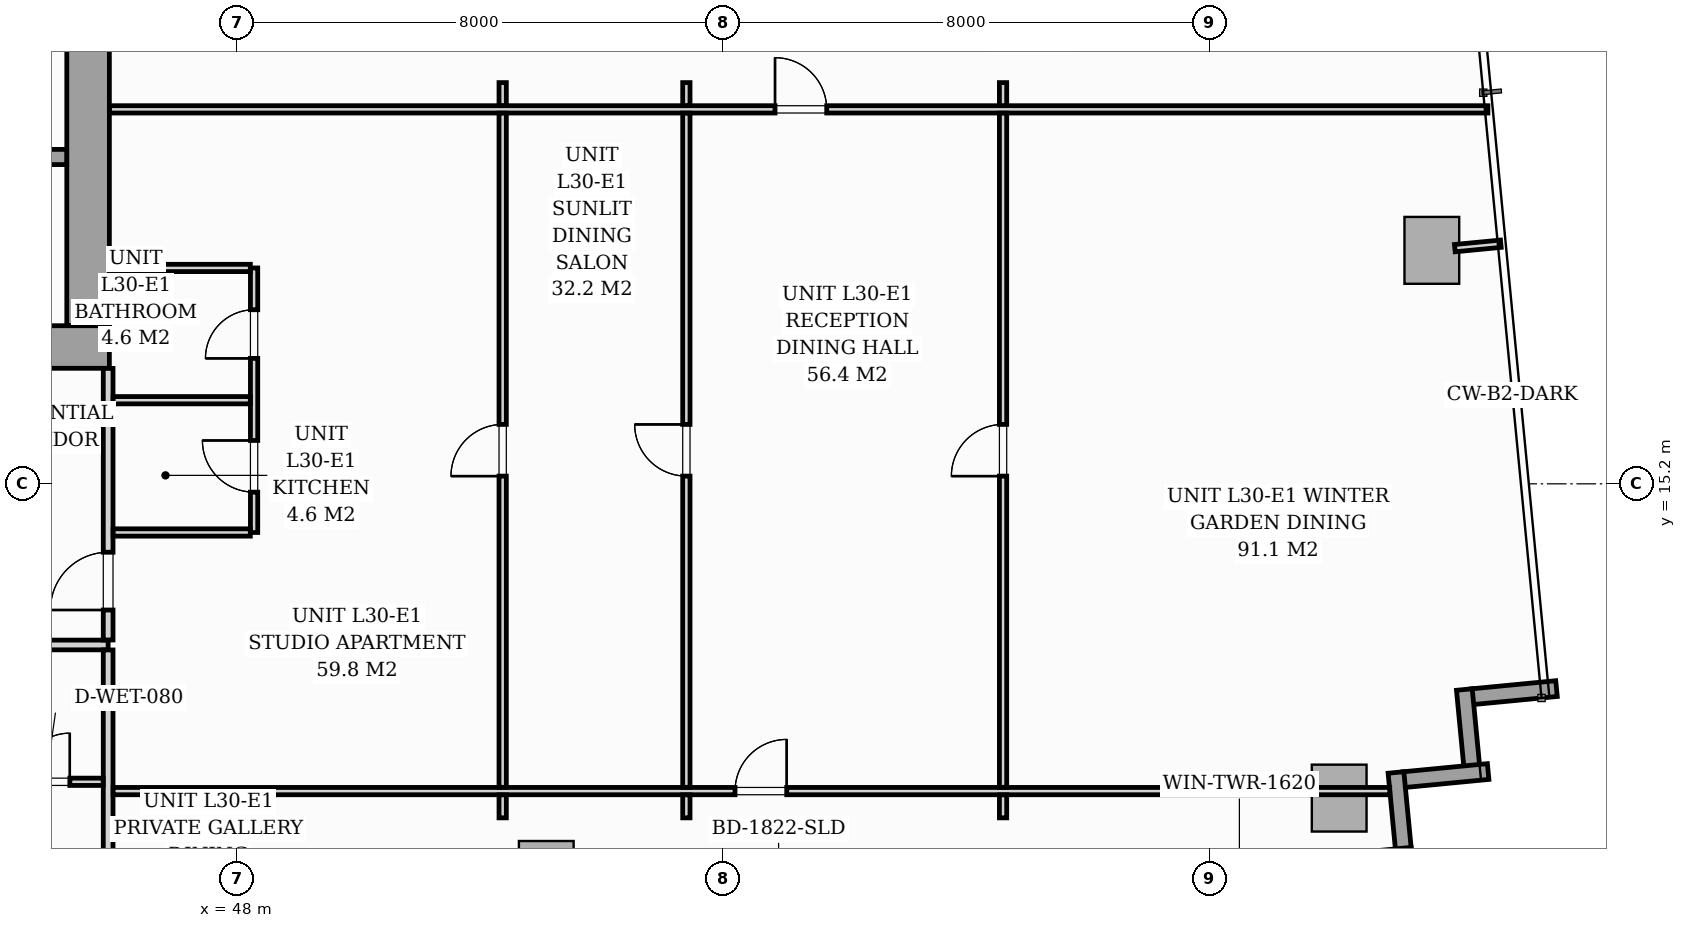
"""IFC4 building model, lengths in metres.
Left out: names, types, materials, properties, quantities, classifications, styles, units other than length and angle.
Written with IfcOpenShell. Run it as: python <this file> out.ifc"""

import sys

from ifc_helpers import new_model, si_unit, direction, frame, frame_2d, origin, origin_2d, place, context, subcontext, project, spatial, rectangle, i_section, extrude, source, transform, mapped, element, fill, save


model = new_model("IFC4")
c1 = context("Model", 3, precision=1e-05, world=origin(), true_north=direction((0.0, 1.0)))
c2 = subcontext(c1, "Body", "Model", "MODEL_VIEW")
j1 = project(units=[si_unit("LENGTHUNIT", "METRE"), si_unit("PLANEANGLEUNIT", "RADIAN")], contexts=[c1])
p1 = place(None, origin())
s1 = spatial("IfcSite", under=j1, at=p1, CompositionType="ELEMENT")
p2 = place(p1, origin())
s2 = spatial("IfcBuilding", under=s1, at=p2, CompositionType="ELEMENT")
p3 = place(p2, frame((0.0, 0.0, 106.6)))
s3 = spatial("IfcBuildingStorey", under=s2, at=p3, CompositionType="ELEMENT", Elevation=106.6)
m1 = source(origin(), c2, "Body", "SweptSolid", [
    extrude(i_section(OverallWidth=0.427, OverallDepth=0.483, WebThickness=0.051, FlangeThickness=0.082, FilletRadius=0.018, at=origin_2d()), origin(), (0.0, 0.0, 1.0), 3.196),
])
p4 = place(p3, frame((45.6, 17.4, 0.002), z_axis=(0.0, 0.0, 1.0), x_axis=(1.0, 0.0, 0.0)))
e1 = element("IfcColumn", 1, at=p4, inside=s3, PredefinedType="PILASTER", context=c2, shape_type="MappedRepresentation", body=[
    mapped(m1, transform((0.0, 0.0, 0.0), scale=1.0)),
])
m2 = source(origin(), c2, "Body", "SweptSolid", [
    extrude(rectangle(XDim=0.9, YDim=1.1, at=origin_2d()), origin(), (0.0, 0.0, 1.0), 3.196),
])
for number, where, z_axis, x_axis in (
    (2, (53.085, 8.776, 0.002), (0.0, 0.0, 1.0), (0.995, 0.096, 0.0)),
    (3, (66.125, 10.032, 0.002), (0.0, 0.0, 1.0), (0.995, 0.096, 0.0)),
    (4, (67.648, 19.039, 0.002), (0.0, 0.0, 1.0), (0.995, 0.096, 0.0)),
):
    element("IfcColumn", number, at=place(p3, frame(where, z_axis=z_axis, x_axis=x_axis)), inside=s3, PredefinedType="COLUMN", context=c2, shape_type="MappedRepresentation", body=[
        mapped(m2, transform((0.0, 0.0, 0.0), scale=1.0)),
    ])
for number, where, z_axis, x_axis in (
    (5, (69.698, 11.833, 0.0), (0.0, 0.0, 1.0), (-0.995, -0.096, 0.0)),
    (6, (68.183, 11.817, 0.0), (0.0, 0.0, 1.0), (0.096, -0.995, 0.0)),
):
    element("IfcWall", number, at=place(p3, frame(where, z_axis=z_axis, x_axis=x_axis)), inside=s3, PredefinedType="STANDARD", context=c2, shape_type="SweptSolid", body=[
        extrude(rectangle(XDim=1.395, YDim=0.26, at=frame_2d((0.697, 0.0))), origin(), (0.0, 0.0, 1.0), 2.94),
    ])
p5 = place(p3, frame((68.574, 10.469, 0.0), z_axis=(0.0, 0.0, 1.0), x_axis=(-0.99540774648, -0.095725744959, 0.0)))
e7 = element("IfcWall", 7, at=p5, inside=s3, PredefinedType="STANDARD", context=c2, shape_type="SweptSolid", body=[
    extrude(rectangle(XDim=1.395, YDim=0.26, at=frame_2d((0.698, 0.0))), origin(), (0.0, 0.0, 1.0), 2.94),
])
p6 = place(p3, frame((67.059, 10.453, 0.0), z_axis=(0.0, 0.0, 1.0), x_axis=(0.095915846097, -0.995389446633, 0.0)))
e8 = element("IfcWall", 8, at=p6, inside=s3, PredefinedType="STANDARD", context=c2, shape_type="SweptSolid", body=[
    extrude(rectangle(XDim=1.395, YDim=0.26, at=frame_2d((0.697, 0.0))), origin(), (0.0, 0.0, 1.0), 2.94),
])
p7 = place(p3, frame((67.32, 9.092, 0.0), z_axis=(0.0, 0.0, 1.0), x_axis=(-0.995396521236, -0.095842399342, 0.0)))
e9 = element("IfcWall", 9, at=p7, inside=s3, PredefinedType="STANDARD", context=c2, shape_type="SweptSolid", body=[
    extrude(rectangle(XDim=19.11, YDim=0.26, at=frame_2d((9.555, 0.0))), origin(), (0.0, 0.0, 1.0), 2.94),
])
p8 = place(p7, frame((9.563, 0.0, 0.0)))
e10 = element("IfcOpeningElement", 10, at=p8, cuts=e9, PredefinedType="OPENING", context=c2, shape_type="SweptSolid", body=[
    extrude(rectangle(XDim=1.8, YDim=2.06, at=frame_2d((0.9, 1.03))), frame((0.0, 0.14, 0.0), z_axis=(0.0, -1.0, 0.0), x_axis=(1.0, 0.0, 0.0)), (0.0, 0.0, 1.0), 0.28),
])
p9 = place(p7, frame((2.05, 0.0, 0.65)))
e11 = element("IfcOpeningElement", 11, at=p9, cuts=e9, PredefinedType="OPENING", context=c2, shape_type="SweptSolid", body=[
    extrude(rectangle(XDim=1.6, YDim=1.5, at=frame_2d((0.8, 0.75))), frame((0.0, 0.14, 0.0), z_axis=(0.0, -1.0, 0.0), x_axis=(1.0, 0.0, 0.0)), (0.0, 0.0, 1.0), 0.28),
])
p10 = place(p3, frame((26.1, 17.45, 0.0), z_axis=(0.0, 0.0, 1.0), x_axis=(1.0, 0.0, 0.0)))
e12 = element("IfcWall", 12, at=p10, inside=s3, PredefinedType="SHEAR", context=c2, shape_type="SweptSolid", body=[
    extrude(rectangle(XDim=19.8, YDim=0.7, at=frame_2d((9.9, 0.0))), origin(), (0.0, 0.0, 1.0), 3.2),
])
p11 = place(p10, frame((1.05, 0.0, 0.0)))
e13 = element("IfcOpeningElement", 13, at=p11, cuts=e12, PredefinedType="OPENING", context=c2, shape_type="SweptSolid", body=[
    extrude(rectangle(XDim=0.95, YDim=2.06, at=frame_2d((0.475, 1.03))), frame((0.0, 0.36, 0.0), z_axis=(0.0, -1.0, 0.0), x_axis=(1.0, 0.0, 0.0)), (0.0, 0.0, 1.0), 0.72),
])
p12 = place(p10, frame((9.48, 0.0, 0.0)))
e14 = element("IfcOpeningElement", 14, at=p12, cuts=e12, PredefinedType="OPENING", context=c2, shape_type="SweptSolid", body=[
    extrude(rectangle(XDim=0.85, YDim=2.0, at=frame_2d((0.425, 1.0))), frame((0.0, 0.36, 0.0), z_axis=(0.0, -1.0, 0.0), x_axis=(1.0, 0.0, 0.0)), (0.0, 0.0, 1.0), 0.72),
])
p13 = place(p10, frame((17.65, 0.0, 0.0)))
e15 = element("IfcOpeningElement", 15, at=p13, cuts=e12, PredefinedType="OPENING", context=c2, shape_type="SweptSolid", body=[
    extrude(rectangle(XDim=0.95, YDim=2.06, at=frame_2d((0.475, 1.03))), frame((0.0, 0.36, 0.0), z_axis=(0.0, -1.0, 0.0), x_axis=(1.0, 0.0, 0.0)), (0.0, 0.0, 1.0), 0.72),
])
p14 = place(p3, frame((45.55, 17.802, 0.0), z_axis=(0.0, 0.0, 1.0), x_axis=(0.0, 1.0, 0.0)))
e16 = element("IfcWall", 16, at=p14, inside=s3, PredefinedType="SHEAR", context=c2, shape_type="SweptSolid", body=[
    extrude(rectangle(XDim=5.796, YDim=0.7, at=frame_2d((2.898, 0.0))), origin(), (0.0, 0.0, 1.0), 3.2),
])
p15 = place(p3, frame((37.05, 20.575, 0.0), z_axis=(0.0, 0.0, 1.0), x_axis=(1.0, 0.0, 0.0)))
e17 = element("IfcWall", 17, at=p15, inside=s3, PredefinedType="SOLIDWALL", context=c2, shape_type="SweptSolid", body=[
    extrude(rectangle(XDim=8.148, YDim=0.25, at=frame_2d((4.074, 0.0))), origin(), (0.0, 0.0, 1.0), 3.2),
])
p16 = place(p15, frame((6.6, 0.0, 0.0)))
e18 = element("IfcOpeningElement", 18, at=p16, cuts=e17, PredefinedType="OPENING", context=c2, shape_type="SweptSolid", body=[
    extrude(rectangle(XDim=0.95, YDim=2.06, at=frame_2d((0.475, 1.03))), frame((0.0, 0.135, 0.0), z_axis=(0.0, -1.0, 0.0), x_axis=(1.0, 0.0, 0.0)), (0.0, 0.0, 1.0), 0.27),
])
p17 = place(p3, frame((21.5, 12.55, 0.0), z_axis=(0.0, 0.0, 1.0), x_axis=(1.0, 0.0, 0.0)))
e19 = element("IfcWall", 19, at=p17, inside=s3, PredefinedType="PARTITIONING", context=c2, shape_type="SweptSolid", body=[
    extrude(rectangle(XDim=24.38, YDim=0.16, at=frame_2d((12.19, 0.0))), origin(), (0.0, 0.0, 1.0), 2.94),
])
p18 = place(p17, frame((6.075, 0.0, 0.0)))
e20 = element("IfcOpeningElement", 20, at=p18, cuts=e19, PredefinedType="OPENING", context=c2, shape_type="SweptSolid", body=[
    extrude(rectangle(XDim=0.95, YDim=2.06, at=frame_2d((0.475, 1.03))), frame((0.0, 0.09, 0.0), z_axis=(0.0, -1.0, 0.0), x_axis=(1.0, 0.0, 0.0)), (0.0, 0.0, 1.0), 0.18),
])
p19 = place(p17, frame((10.519, 0.0, 0.0)))
e21 = element("IfcOpeningElement", 21, at=p19, cuts=e19, PredefinedType="OPENING", context=c2, shape_type="SweptSolid", body=[
    extrude(rectangle(XDim=0.95, YDim=2.06, at=frame_2d((0.475, 1.03))), frame((0.0, 0.09, 0.0), z_axis=(0.0, -1.0, 0.0), x_axis=(1.0, 0.0, 0.0)), (0.0, 0.0, 1.0), 0.18),
])
p20 = place(p17, frame((18.208, 0.0, 0.0)))
e22 = element("IfcOpeningElement", 22, at=p20, cuts=e19, PredefinedType="OPENING", context=c2, shape_type="SweptSolid", body=[
    extrude(rectangle(XDim=0.95, YDim=2.06, at=frame_2d((0.475, 1.03))), frame((0.0, 0.09, 0.0), z_axis=(0.0, -1.0, 0.0), x_axis=(1.0, 0.0, 0.0)), (0.0, 0.0, 1.0), 0.18),
])
p21 = place(p3, frame((45.88, 6.977, 0.0), z_axis=(0.0, 0.0, 1.0), x_axis=(0.0, 1.0, 0.0)))
e23 = element("IfcWall", 23, at=p21, inside=s3, PredefinedType="PARTITIONING", context=c2, shape_type="SweptSolid", body=[
    extrude(rectangle(XDim=5.491, YDim=0.16, at=frame_2d((2.745, 0.0))), origin(), (0.0, 0.0, 1.0), 2.94),
])
p22 = place(p3, frame((45.88, 12.632, 0.0), z_axis=(0.0, 0.0, 1.0), x_axis=(0.0, 1.0, 0.0)))
e24 = element("IfcWall", 24, at=p22, inside=s3, PredefinedType="PARTITIONING", context=c2, shape_type="SweptSolid", body=[
    extrude(rectangle(XDim=4.466, YDim=0.16, at=frame_2d((2.233, 0.0))), origin(), (0.0, 0.0, 1.0), 2.94),
])
p23 = place(p22, frame((0.493, 0.0, 0.0)))
e25 = element("IfcOpeningElement", 25, at=p23, cuts=e24, PredefinedType="OPENING", context=c2, shape_type="SweptSolid", body=[
    extrude(rectangle(XDim=0.95, YDim=2.06, at=frame_2d((0.475, 1.03))), frame((0.0, 0.09, 0.0), z_axis=(0.0, -1.0, 0.0), x_axis=(1.0, 0.0, 0.0)), (0.0, 0.0, 1.0), 0.18),
])
p24 = place(p3, frame((41.7, 10.3, 0.0), z_axis=(0.0, 0.0, 1.0), x_axis=(1.0, 0.0, 0.0)))
e26 = element("IfcWall", 26, at=p24, inside=s3, PredefinedType="PARTITIONING", context=c2, shape_type="SweptSolid", body=[
    extrude(rectangle(XDim=4.098, YDim=0.12, at=frame_2d((2.049, 0.0))), origin(), (0.0, 0.0, 1.0), 2.94),
])
p25 = place(p24, frame((0.675, 0.0, 0.0)))
e27 = element("IfcOpeningElement", 27, at=p25, cuts=e26, PredefinedType="OPENING", context=c2, shape_type="SweptSolid", body=[
    extrude(rectangle(XDim=0.85, YDim=2.05, at=frame_2d((0.425, 1.025))), frame((0.0, 0.07, 0.0), z_axis=(0.0, -1.0, 0.0), x_axis=(1.0, 0.0, 0.0)), (0.0, 0.0, 1.0), 0.14),
])
p26 = place(p24, frame((2.75, 0.0, 0.0)))
e28 = element("IfcOpeningElement", 28, at=p26, cuts=e26, PredefinedType="OPENING", context=c2, shape_type="SweptSolid", body=[
    extrude(rectangle(XDim=0.8, YDim=2.02, at=frame_2d((0.4, 1.01))), frame((0.0, 0.07, 0.0), z_axis=(0.0, -1.0, 0.0), x_axis=(1.0, 0.0, 0.0)), (0.0, 0.0, 1.0), 0.14),
])
p27 = place(p3, frame((48.28, 14.4, 0.0), z_axis=(0.0, 0.0, 1.0), x_axis=(0.0, 1.0, 0.0)))
e29 = element("IfcWall", 29, at=p27, inside=s3, PredefinedType="PARTITIONING", context=c2, shape_type="SweptSolid", body=[
    extrude(rectangle(XDim=4.35, YDim=0.12, at=frame_2d((2.175, 0.0))), origin(), (0.0, 0.0, 1.0), 2.94),
])
p28 = place(p27, frame((0.663, 0.0, 0.0)))
e30 = element("IfcOpeningElement", 30, at=p28, cuts=e29, PredefinedType="OPENING", context=c2, shape_type="SweptSolid", body=[
    extrude(rectangle(XDim=0.85, YDim=2.05, at=frame_2d((0.425, 1.025))), frame((0.0, 0.07, 0.0), z_axis=(0.0, -1.0, 0.0), x_axis=(1.0, 0.0, 0.0)), (0.0, 0.0, 1.0), 0.14),
])
p29 = place(p27, frame((2.863, 0.0, 0.0)))
e31 = element("IfcOpeningElement", 31, at=p29, cuts=e29, PredefinedType="OPENING", context=c2, shape_type="SweptSolid", body=[
    extrude(rectangle(XDim=0.8, YDim=2.02, at=frame_2d((0.4, 1.01))), frame((0.0, 0.07, 0.0), z_axis=(0.0, -1.0, 0.0), x_axis=(1.0, 0.0, 0.0)), (0.0, 0.0, 1.0), 0.14),
])
for number, where, z_axis, x_axis in (
    (32, (45.962, 16.575, 0.0), (0.0, 0.0, 1.0), (1.0, 0.0, 0.0)),
    (33, (45.962, 14.4, 0.0), (0.0, 0.0, 1.0), (1.0, 0.0, 0.0)),
):
    element("IfcWall", number, at=place(p3, frame(where, z_axis=z_axis, x_axis=x_axis)), inside=s3, PredefinedType="PARTITIONING", context=c2, shape_type="SweptSolid", body=[
        extrude(rectangle(XDim=2.256, YDim=0.12, at=frame_2d((1.128, 0.0))), origin(), (0.0, 0.0, 1.0), 2.94),
    ])
p30 = place(p3, frame((45.902, 18.75, 0.0), z_axis=(0.0, 0.0, 1.0), x_axis=(1.0, 0.0, 0.0)))
e34 = element("IfcWall", 34, at=p30, inside=s3, PredefinedType="PARTITIONING", context=c2, shape_type="SweptSolid", body=[
    extrude(rectangle(XDim=2.316, YDim=0.12, at=frame_2d((1.158, 0.0))), origin(), (0.0, 0.0, 1.0), 2.94),
])
p31 = place(p3, frame((45.902, 21.358, 0.0), z_axis=(0.0, 0.0, 1.0), x_axis=(1.0, 0.0, 0.0)))
e35 = element("IfcWall", 35, at=p31, inside=s3, PredefinedType="PARTITIONING", context=c2, shape_type="SweptSolid", body=[
    extrude(rectangle(XDim=22.668, YDim=0.12, at=frame_2d((11.334, 0.0))), origin(), (0.0, 0.0, 1.0), 2.94),
])
p32 = place(p31, frame((10.945, 0.0, 0.0)))
e36 = element("IfcOpeningElement", 36, at=p32, cuts=e35, PredefinedType="OPENING", context=c2, shape_type="SweptSolid", body=[
    extrude(rectangle(XDim=0.85, YDim=2.05, at=frame_2d((0.425, 1.025))), frame((0.0, 0.07, 0.0), z_axis=(0.0, -1.0, 0.0), x_axis=(1.0, 0.0, 0.0)), (0.0, 0.0, 1.0), 0.14),
])
p33 = place(p3, frame((45.962, 10.147, 0.0), z_axis=(0.0, 0.0, 1.0), x_axis=(1.0, 0.0, 0.0)))
e37 = element("IfcWall", 37, at=p33, inside=s3, PredefinedType="PARTITIONING", context=c2, shape_type="SweptSolid", body=[
    extrude(rectangle(XDim=20.994, YDim=0.12, at=frame_2d((10.497, 0.0))), origin(), (0.0, 0.0, 1.0), 2.31),
])
p34 = place(p33, frame((10.227, 0.0, 0.0)))
e38 = element("IfcOpeningElement", 38, at=p34, cuts=e37, PredefinedType="OPENING", context=c2, shape_type="SweptSolid", body=[
    extrude(rectangle(XDim=0.85, YDim=2.05, at=frame_2d((0.425, 1.025))), frame((0.0, 0.07, 0.0), z_axis=(0.0, -1.0, 0.0), x_axis=(1.0, 0.0, 0.0)), (0.0, 0.0, 1.0), 0.14),
])
p35 = place(p3, frame((60.597, 9.707, 0.0), z_axis=(0.0, 0.0, 1.0), x_axis=(0.0, 1.0, 0.0)))
e39 = element("IfcWall", 39, at=p35, inside=s3, PredefinedType="PARTITIONING", context=c2, shape_type="SweptSolid", body=[
    extrude(rectangle(XDim=0.378, YDim=0.12, at=frame_2d((0.189, 0.0))), origin(), (0.0, 0.0, 1.0), 2.94),
])
p36 = place(p3, frame((60.597, 10.209, 0.0), z_axis=(0.0, 0.0, 1.0), x_axis=(0.0, 1.0, 0.0)))
e40 = element("IfcWall", 40, at=p36, inside=s3, PredefinedType="PARTITIONING", context=c2, shape_type="SweptSolid", body=[
    extrude(rectangle(XDim=11.087, YDim=0.12, at=frame_2d((5.543, 0.0))), origin(), (0.0, 0.0, 1.0), 2.94),
])
p37 = place(p36, frame((5.118, 0.0, 0.0)))
e41 = element("IfcOpeningElement", 41, at=p37, cuts=e40, PredefinedType="OPENING", context=c2, shape_type="SweptSolid", body=[
    extrude(rectangle(XDim=0.85, YDim=2.05, at=frame_2d((0.425, 1.025))), frame((0.0, 0.07, 0.0), z_axis=(0.0, -1.0, 0.0), x_axis=(1.0, 0.0, 0.0)), (0.0, 0.0, 1.0), 0.14),
])
p38 = place(p3, frame((60.597, 21.42, 0.0), z_axis=(0.0, 0.0, 1.0), x_axis=(0.0, 1.0, 0.0)))
e42 = element("IfcWall", 42, at=p38, inside=s3, PredefinedType="PARTITIONING", context=c2, shape_type="SweptSolid", body=[
    extrude(rectangle(XDim=0.378, YDim=0.12, at=frame_2d((0.189, 0.0))), origin(), (0.0, 0.0, 1.0), 2.94),
])
p39 = place(p3, frame((55.389, 9.707, 0.0), z_axis=(0.0, 0.0, 1.0), x_axis=(0.0, 1.0, 0.0)))
e43 = element("IfcWall", 43, at=p39, inside=s3, PredefinedType="PARTITIONING", context=c2, shape_type="SweptSolid", body=[
    extrude(rectangle(XDim=0.378, YDim=0.12, at=frame_2d((0.189, 0.0))), origin(), (0.0, 0.0, 1.0), 2.94),
])
p40 = place(p3, frame((55.389, 10.209, 0.0), z_axis=(0.0, 0.0, 1.0), x_axis=(0.0, 1.0, 0.0)))
e44 = element("IfcWall", 44, at=p40, inside=s3, PredefinedType="PARTITIONING", context=c2, shape_type="SweptSolid", body=[
    extrude(rectangle(XDim=11.087, YDim=0.12, at=frame_2d((5.543, 0.0))), origin(), (0.0, 0.0, 1.0), 2.94),
])
p41 = place(p40, frame((5.118, 0.0, 0.0)))
e45 = element("IfcOpeningElement", 45, at=p41, cuts=e44, PredefinedType="OPENING", context=c2, shape_type="SweptSolid", body=[
    extrude(rectangle(XDim=0.85, YDim=2.05, at=frame_2d((0.425, 1.025))), frame((0.0, 0.07, 0.0), z_axis=(0.0, -1.0, 0.0), x_axis=(1.0, 0.0, 0.0)), (0.0, 0.0, 1.0), 0.14),
])
p42 = place(p3, frame((55.389, 21.42, 0.0), z_axis=(0.0, 0.0, 1.0), x_axis=(0.0, 1.0, 0.0)))
e46 = element("IfcWall", 46, at=p42, inside=s3, PredefinedType="PARTITIONING", context=c2, shape_type="SweptSolid", body=[
    extrude(rectangle(XDim=0.378, YDim=0.12, at=frame_2d((0.189, 0.0))), origin(), (0.0, 0.0, 1.0), 2.94),
])
p43 = place(p3, frame((52.368, 9.707, 0.0), z_axis=(0.0, 0.0, 1.0), x_axis=(0.0, 1.0, 0.0)))
e47 = element("IfcWall", 47, at=p43, inside=s3, PredefinedType="PARTITIONING", context=c2, shape_type="SweptSolid", body=[
    extrude(rectangle(XDim=0.378, YDim=0.12, at=frame_2d((0.189, 0.0))), origin(), (0.0, 0.0, 1.0), 2.94),
])
p44 = place(p3, frame((52.368, 10.209, 0.0), z_axis=(0.0, 0.0, 1.0), x_axis=(0.0, 1.0, 0.0)))
e48 = element("IfcWall", 48, at=p44, inside=s3, PredefinedType="PARTITIONING", context=c2, shape_type="SweptSolid", body=[
    extrude(rectangle(XDim=11.087, YDim=0.12, at=frame_2d((5.543, 0.0))), origin(), (0.0, 0.0, 1.0), 2.94),
])
p45 = place(p44, frame((5.118, 0.0, 0.0)))
e49 = element("IfcOpeningElement", 49, at=p45, cuts=e48, PredefinedType="OPENING", context=c2, shape_type="SweptSolid", body=[
    extrude(rectangle(XDim=0.85, YDim=2.05, at=frame_2d((0.425, 1.025))), frame((0.0, 0.07, 0.0), z_axis=(0.0, -1.0, 0.0), x_axis=(1.0, 0.0, 0.0)), (0.0, 0.0, 1.0), 0.14),
])
p46 = place(p3, frame((52.368, 21.42, 0.0), z_axis=(0.0, 0.0, 1.0), x_axis=(0.0, 1.0, 0.0)))
e50 = element("IfcWall", 50, at=p46, inside=s3, PredefinedType="PARTITIONING", context=c2, shape_type="SweptSolid", body=[
    extrude(rectangle(XDim=0.378, YDim=0.12, at=frame_2d((0.189, 0.0))), origin(), (0.0, 0.0, 1.0), 2.94),
])
p47 = place(p3, frame((68.027, 19.076, 0.0), z_axis=(0.0, 0.0, 1.0), x_axis=(0.995377786728, 0.096036772582, 0.0)))
e51 = element("IfcWall", 51, at=p47, inside=s3, PredefinedType="PARTITIONING", context=c2, shape_type="SweptSolid", body=[
    extrude(rectangle(XDim=0.76, YDim=0.12, at=frame_2d((0.38, 0.0))), origin(), (0.0, 0.0, 1.0), 2.94),
])
m3 = source(origin(), c2, "Body", "SweptSolid", [
    extrude(rectangle(XDim=0.8, YDim=2.02, at=frame_2d((0.4, 1.01))), frame((0.0, 0.025, 0.0), z_axis=(0.0, -1.0, 0.0), x_axis=(1.0, 0.0, 0.0)), (0.0, 0.0, 1.0), 0.05),
])
p48 = place(p26, origin())
e52 = element("IfcDoor", 52, at=p48, inside=s3, OperationType="SINGLE_SWING_RIGHT", PredefinedType="DOOR", context=c2, shape_type="MappedRepresentation", body=[
    mapped(m3, transform((0.0, 0.0, 0.0), scale=1.0)),
])
fill(e28, e52)
m4 = source(origin(), c2, "Body", "SweptSolid", [
    extrude(rectangle(XDim=0.95, YDim=2.06, at=frame_2d((0.475, 1.03))), frame((0.0, 0.025, 0.0), z_axis=(0.0, -1.0, 0.0), x_axis=(1.0, 0.0, 0.0)), (0.0, 0.0, 1.0), 0.05),
])
p49 = place(p23, origin())
e53 = element("IfcDoor", 53, at=p49, inside=s3, OperationType="SINGLE_SWING_LEFT", PredefinedType="DOOR", context=c2, shape_type="MappedRepresentation", body=[
    mapped(m4, transform((0.0, 0.0, 0.0), scale=1.0)),
])
fill(e25, e53)
m5 = source(origin(), c2, "Body", "SweptSolid", [
    extrude(rectangle(XDim=0.85, YDim=2.05, at=frame_2d((0.425, 1.025))), frame((0.0, 0.025, 0.0), z_axis=(0.0, -1.0, 0.0), x_axis=(1.0, 0.0, 0.0)), (0.0, 0.0, 1.0), 0.05),
])
p50 = place(p28, origin())
e54 = element("IfcDoor", 54, at=p50, inside=s3, OperationType="SINGLE_SWING_RIGHT", PredefinedType="DOOR", context=c2, shape_type="MappedRepresentation", body=[
    mapped(m5, transform((0.0, 0.0, 0.0), scale=1.0)),
])
fill(e30, e54)
p51 = place(p29, origin())
e55 = element("IfcDoor", 55, at=p51, inside=s3, OperationType="SINGLE_SWING_LEFT", PredefinedType="DOOR", context=c2, shape_type="MappedRepresentation", body=[
    mapped(m3, transform((0.0, 0.0, 0.0), scale=1.0)),
])
fill(e31, e55)
p52 = place(p32, origin())
e56 = element("IfcDoor", 56, at=p52, inside=s3, OperationType="SINGLE_SWING_LEFT", PredefinedType="DOOR", context=c2, shape_type="MappedRepresentation", body=[
    mapped(m5, transform((0.0, 0.0, 0.0), scale=1.0)),
])
fill(e36, e56)
p53 = place(p34, origin())
e57 = element("IfcDoor", 57, at=p53, inside=s3, OperationType="SINGLE_SWING_RIGHT", PredefinedType="DOOR", context=c2, shape_type="MappedRepresentation", body=[
    mapped(m5, transform((0.0, 0.0, 0.0), scale=1.0)),
])
fill(e38, e57)
p54 = place(p37, origin())
e58 = element("IfcDoor", 58, at=p54, inside=s3, OperationType="SINGLE_SWING_LEFT", PredefinedType="DOOR", context=c2, shape_type="MappedRepresentation", body=[
    mapped(m5, transform((0.0, 0.0, 0.0), scale=1.0)),
])
fill(e41, e58)
p55 = place(p41, origin())
e59 = element("IfcDoor", 59, at=p55, inside=s3, OperationType="SINGLE_SWING_RIGHT", PredefinedType="DOOR", context=c2, shape_type="MappedRepresentation", body=[
    mapped(m5, transform((0.0, 0.0, 0.0), scale=1.0)),
])
fill(e45, e59)
p56 = place(p45, origin())
e60 = element("IfcDoor", 60, at=p56, inside=s3, OperationType="SINGLE_SWING_LEFT", PredefinedType="DOOR", context=c2, shape_type="MappedRepresentation", body=[
    mapped(m5, transform((0.0, 0.0, 0.0), scale=1.0)),
])
fill(e49, e60)
save(model, sys.argv[1])
